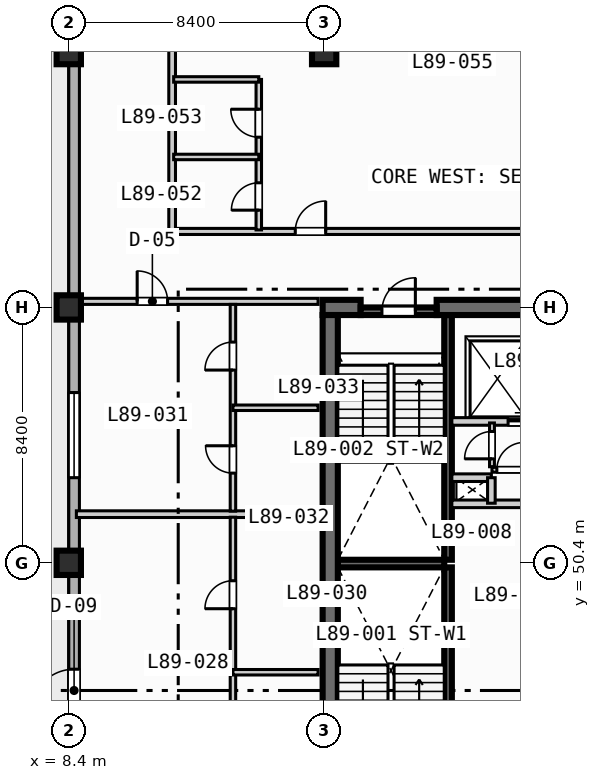
"""IFC4 building model, lengths in metres.
Left out: names, types, materials, properties, quantities, classifications, styles, units other than length and angle.
Written with IfcOpenShell. Run it as: python <this file> out.ifc"""

import sys

from ifc_helpers import new_model, si_unit, direction, frame, frame_2d, origin, origin_2d, place, context, subcontext, project, spatial, rectangle, extrude, element, fill, save


model = new_model("IFC4")
c1 = context("Model", 3, precision=1e-05, world=origin(), true_north=direction((0.0, 1.0)))
c2 = subcontext(c1, "Body", "Model", "MODEL_VIEW")
j1 = project(units=[si_unit("LENGTHUNIT", "METRE"), si_unit("PLANEANGLEUNIT", "RADIAN")], contexts=[c1])
p1 = place(None, origin())
s1 = spatial("IfcSite", under=j1, at=p1, CompositionType="ELEMENT")
p2 = place(p1, origin())
s2 = spatial("IfcBuilding", under=s1, at=p2, CompositionType="ELEMENT")
p3 = place(p2, frame((0.0, 0.0, 359.6)))
s3 = spatial("IfcBuildingStorey", under=s2, at=p3, CompositionType="ELEMENT", Elevation=359.6)
for number, where, z_axis, x_axis in (
    (1, (20.875, 42.2, 0.0), (0.0, 0.0, 1.0), (0.0, 1.0, 0.0)),
    (2, (20.875, 50.5, 0.0), (0.0, 0.0, 1.0), (0.0, 1.0, 0.0)),
):
    element("IfcWall", number, at=place(p3, frame(where, z_axis=z_axis, x_axis=x_axis)), inside=s3, PredefinedType="SOLIDWALL", context=c2, shape_type="SweptSolid", body=[
        extrude(rectangle(XDim=8.05, YDim=0.25, at=frame_2d((4.025, 0.0))), origin(), (0.0, 0.0, 1.0), 3.9),
    ])
p4 = place(p3, frame((17.25, 50.375, 0.0), z_axis=(0.0, 0.0, 1.0), x_axis=(1.0, 0.0, 0.0)))
e3 = element("IfcWall", 3, at=p4, inside=s3, PredefinedType="SOLIDWALL", context=c2, shape_type="SweptSolid", body=[
    extrude(rectangle(XDim=3.5, YDim=0.25, at=frame_2d((1.75, 0.0))), origin(), (0.0, 0.0, 1.0), 3.9),
])
p5 = place(p3, frame((16.75, 58.8, 0.0), z_axis=(0.0, 0.0, 1.0), x_axis=(1.0, 0.0, 0.0)))
e4 = element("IfcWall", 4, at=p5, inside=s3, PredefinedType="SHEAR", context=c2, shape_type="SweptSolid", body=[
    extrude(rectangle(XDim=1.25, YDim=0.5, at=frame_2d((0.625, 0.0))), origin(), (0.0, 0.0, 1.0), 3.9),
])
p6 = place(p3, frame((20.5, 58.8, 0.0), z_axis=(0.0, 0.0, 1.0), x_axis=(1.0, 0.0, 0.0)))
e5 = element("IfcWall", 5, at=p6, inside=s3, PredefinedType="SHEAR", context=c2, shape_type="SweptSolid", body=[
    extrude(rectangle(XDim=4.95, YDim=0.5, at=frame_2d((2.475, 0.0))), origin(), (0.0, 0.0, 1.0), 3.9),
])
p7 = place(p3, frame((17.0, 42.2, 0.0), z_axis=(0.0, 0.0, 1.0), x_axis=(0.0, 1.0, 0.0)))
e6 = element("IfcWall", 6, at=p7, inside=s3, PredefinedType="SHEAR", context=c2, shape_type="SweptSolid", body=[
    extrude(rectangle(XDim=16.35, YDim=0.5, at=frame_2d((8.175, 0.0))), origin(), (0.0, 0.0, 1.0), 3.9),
])
for number, where, z_axis, x_axis in (
    (7, (8.4, 50.4, 0.0), (0.0, 0.0, 1.0), (1.0, 0.0, 0.0)),
    (8, (8.4, 58.8, 0.0), (0.0, 0.0, 1.0), (1.0, 0.0, 0.0)),
    (9, (8.4, 67.2, 0.0), (0.0, 0.0, 1.0), (1.0, 0.0, 0.0)),
    (10, (16.8, 67.2, 0.0), (0.0, 0.0, 1.0), (1.0, 0.0, 0.0)),
):
    element("IfcColumn", number, at=place(p3, frame(where, z_axis=z_axis, x_axis=x_axis)), inside=s3, PredefinedType="COLUMN", context=c2, shape_type="SweptSolid", body=[
        extrude(rectangle(XDim=0.8, YDim=0.8, at=origin_2d()), origin(), (0.0, 0.0, 1.0), 4.2),
    ])
p8 = place(p3, frame((8.575, 11.575, 0.0), z_axis=(0.0, 0.0, 1.0), x_axis=(0.0, 1.0, 0.0)))
e11 = element("IfcWall", 11, at=p8, inside=s3, PredefinedType="STANDARD", context=c2, shape_type="SweptSolid", body=[
    extrude(rectangle(XDim=60.85, YDim=0.35, at=frame_2d((30.425, 0.0))), origin(), (0.0, 0.0, 1.0), 3.9),
])
p9 = place(p8, frame((33.925, 0.0, 0.0)))
e12 = element("IfcOpeningElement", 12, at=p9, cuts=e11, PredefinedType="OPENING", context=c2, shape_type="SweptSolid", body=[
    extrude(rectangle(XDim=1.4, YDim=2.2, at=frame_2d((0.7, 1.1))), frame((0.0, 0.185, 0.0), z_axis=(0.0, -1.0, 0.0), x_axis=(1.0, 0.0, 0.0)), (0.0, 0.0, 1.0), 0.37),
])
p10 = place(p8, frame((24.825, 0.0, 0.85)))
e13 = element("IfcOpeningElement", 13, at=p10, cuts=e11, PredefinedType="OPENING", context=c2, shape_type="SweptSolid", body=[
    extrude(rectangle(XDim=2.8, YDim=2.1, at=frame_2d((1.4, 1.05))), frame((0.0, 0.185, 0.0), z_axis=(0.0, -1.0, 0.0), x_axis=(1.0, 0.0, 0.0)), (0.0, 0.0, 1.0), 0.37),
])
p11 = place(p8, frame((41.625, 0.0, 0.85)))
e14 = element("IfcOpeningElement", 14, at=p11, cuts=e11, PredefinedType="OPENING", context=c2, shape_type="SweptSolid", body=[
    extrude(rectangle(XDim=2.8, YDim=2.1, at=frame_2d((1.4, 1.05))), frame((0.0, 0.185, 0.0), z_axis=(0.0, -1.0, 0.0), x_axis=(1.0, 0.0, 0.0)), (0.0, 0.0, 1.0), 0.37),
])
p12 = place(p8, frame((19.25, 0.0, 0.85)))
e15 = element("IfcOpeningElement", 15, at=p12, cuts=e11, PredefinedType="OPENING", context=c2, shape_type="SweptSolid", body=[
    extrude(rectangle(XDim=1.8, YDim=1.8, at=frame_2d((0.9, 0.9))), frame((0.0, 0.185, 0.0), z_axis=(0.0, -1.0, 0.0), x_axis=(1.0, 0.0, 0.0)), (0.0, 0.0, 1.0), 0.37),
])
p13 = place(p3, frame((18.0, 58.675, 0.0), z_axis=(0.0, 0.0, 1.0), x_axis=(1.0, 0.0, 0.0)))
e16 = element("IfcWall", 16, at=p13, inside=s3, PredefinedType="SOLIDWALL", context=c2, shape_type="SweptSolid", body=[
    extrude(rectangle(XDim=2.5, YDim=0.25, at=frame_2d((1.25, 0.0))), origin(), (0.0, 0.0, 1.0), 3.9),
])
p14 = place(p13, frame((0.7, 0.0, 0.0)))
e17 = element("IfcOpeningElement", 17, at=p14, cuts=e16, PredefinedType="OPENING", context=c2, shape_type="SweptSolid", body=[
    extrude(rectangle(XDim=1.1, YDim=2.15, at=frame_2d((0.55, 1.075))), frame((0.0, 0.135, 0.0), z_axis=(0.0, -1.0, 0.0), x_axis=(1.0, 0.0, 0.0)), (0.0, 0.0, 1.0), 0.27),
])
p15 = place(p3, frame((21.0, 52.34, 0.0), z_axis=(0.0, 0.0, 1.0), x_axis=(1.0, 0.0, 0.0)))
e18 = element("IfcWall", 18, at=p15, inside=s3, PredefinedType="SOLIDWALL", context=c2, shape_type="SweptSolid", body=[
    extrude(rectangle(XDim=3.95, YDim=0.25, at=frame_2d((1.975, 0.0))), origin(), (0.0, 0.0, 1.0), 3.9),
])
p16 = place(p3, frame((21.0, 55.05, 0.0), z_axis=(0.0, 0.0, 1.0), x_axis=(1.0, 0.0, 0.0)))
e19 = element("IfcWall", 19, at=p16, inside=s3, PredefinedType="SOLIDWALL", context=c2, shape_type="SweptSolid", body=[
    extrude(rectangle(XDim=4.15, YDim=0.25, at=frame_2d((2.075, 0.0))), origin(), (0.0, 0.0, 1.0), 3.9),
])
p17 = place(p16, frame((1.85, 0.0, 0.0)))
e20 = element("IfcOpeningElement", 20, at=p17, cuts=e19, PredefinedType="OPENING", context=c2, shape_type="SweptSolid", body=[
    extrude(rectangle(XDim=1.1, YDim=2.15, at=frame_2d((0.55, 1.075))), frame((0.0, 0.135, 0.0), z_axis=(0.0, -1.0, 0.0), x_axis=(1.0, 0.0, 0.0)), (0.0, 0.0, 1.0), 0.27),
])
p18 = place(p3, frame((21.0, 53.2, 0.0), z_axis=(0.0, 0.0, 1.0), x_axis=(1.0, 0.0, 0.0)))
e21 = element("IfcWall", 21, at=p18, inside=s3, PredefinedType="SOLIDWALL", context=c2, shape_type="SweptSolid", body=[
    extrude(rectangle(XDim=1.3, YDim=0.25, at=frame_2d((0.65, 0.0))), origin(), (0.0, 0.0, 1.0), 3.9),
])
p19 = place(p3, frame((22.3, 52.36, 0.0), z_axis=(0.0, 0.0, 1.0), x_axis=(0.0, 1.0, 0.0)))
e22 = element("IfcWall", 22, at=p19, inside=s3, PredefinedType="SOLIDWALL", context=c2, shape_type="SweptSolid", body=[
    extrude(rectangle(XDim=0.84, YDim=0.25, at=frame_2d((0.42, 0.0))), origin(), (0.0, 0.0, 1.0), 3.9),
])
p20 = place(p3, frame((22.32, 53.56, 0.0), z_axis=(0.0, 0.0, 1.0), x_axis=(0.0, 1.0, 0.0)))
e23 = element("IfcWall", 23, at=p20, inside=s3, PredefinedType="PARTITIONING", context=c2, shape_type="SweptSolid", body=[
    extrude(rectangle(XDim=1.44, YDim=0.16, at=frame_2d((0.72, 0.0))), origin(), (0.0, 0.0, 1.0), 3.9),
])
p21 = place(p20, frame((0.26, 0.0, 0.0)))
e24 = element("IfcOpeningElement", 24, at=p21, cuts=e23, PredefinedType="OPENING", context=c2, shape_type="SweptSolid", body=[
    extrude(rectangle(XDim=0.9, YDim=2.1, at=frame_2d((0.45, 1.05))), frame((0.0, 0.09, 0.0), z_axis=(0.0, -1.0, 0.0), x_axis=(1.0, 0.0, 0.0)), (0.0, 0.0, 1.0), 0.18),
])
p22 = place(p3, frame((22.32, 53.46, 0.0), z_axis=(0.0, 0.0, 1.0), x_axis=(1.0, 0.0, 0.0)))
e25 = element("IfcWall", 25, at=p22, inside=s3, PredefinedType="PARTITIONING", context=c2, shape_type="SweptSolid", body=[
    extrude(rectangle(XDim=2.36, YDim=0.16, at=frame_2d((1.18, 0.0))), origin(), (0.0, 0.0, 1.0), 3.9),
])
p23 = place(p22, frame((0.16, 0.0, 0.0)))
e26 = element("IfcOpeningElement", 26, at=p23, cuts=e25, PredefinedType="OPENING", context=c2, shape_type="SweptSolid", body=[
    extrude(rectangle(XDim=0.9, YDim=2.1, at=frame_2d((0.45, 1.05))), frame((0.0, 0.09, 0.0), z_axis=(0.0, -1.0, 0.0), x_axis=(1.0, 0.0, 0.0)), (0.0, 0.0, 1.0), 0.18),
])
p24 = place(p3, frame((8.65, 59.0, 0.0), z_axis=(0.0, 0.0, 1.0), x_axis=(1.0, 0.0, 0.0)))
e27 = element("IfcWall", 27, at=p24, inside=s3, PredefinedType="PARTITIONING", context=c2, shape_type="SweptSolid", body=[
    extrude(rectangle(XDim=7.95, YDim=0.2, at=frame_2d((3.975, 0.0))), origin(), (0.0, 0.0, 1.0), 3.437),
])
p25 = place(p24, frame((2.0, 0.0, 0.0)))
e28 = element("IfcOpeningElement", 28, at=p25, cuts=e27, PredefinedType="OPENING", context=c2, shape_type="SweptSolid", body=[
    extrude(rectangle(XDim=1.0, YDim=2.15, at=frame_2d((0.5, 1.075))), frame((0.0, 0.11, 0.0), z_axis=(0.0, -1.0, 0.0), x_axis=(1.0, 0.0, 0.0)), (0.0, 0.0, 1.0), 0.22),
])
p26 = place(p3, frame((8.65, 52.0, 0.0), z_axis=(0.0, 0.0, 1.0), x_axis=(1.0, 0.0, 0.0)))
e29 = element("IfcWall", 29, at=p26, inside=s3, PredefinedType="PARTITIONING", context=c2, shape_type="SweptSolid", body=[
    extrude(rectangle(XDim=7.95, YDim=0.22, at=frame_2d((3.975, 0.0))), origin(), (0.0, 0.0, 1.0), 3.9),
])
p27 = place(p3, frame((13.8, 41.7, 0.0), z_axis=(0.0, 0.0, 1.0), x_axis=(0.0, 1.0, 0.0)))
e30 = element("IfcWall", 30, at=p27, inside=s3, PredefinedType="PLUMBINGWALL", context=c2, shape_type="SweptSolid", body=[
    extrude(rectangle(XDim=10.2, YDim=0.18, at=frame_2d((5.1, 0.0))), origin(), (0.0, 0.0, 1.0), 3.9),
])
p28 = place(p27, frame((2.1, 0.0, 0.0)))
e31 = element("IfcOpeningElement", 31, at=p28, cuts=e30, PredefinedType="OPENING", context=c2, shape_type="SweptSolid", body=[
    extrude(rectangle(XDim=0.9, YDim=2.1, at=frame_2d((0.45, 1.05))), frame((0.0, 0.1, 0.0), z_axis=(0.0, -1.0, 0.0), x_axis=(1.0, 0.0, 0.0)), (0.0, 0.0, 1.0), 0.2),
])
p29 = place(p27, frame((7.19, 0.0, 0.0)))
e32 = element("IfcOpeningElement", 32, at=p29, cuts=e30, PredefinedType="OPENING", context=c2, shape_type="SweptSolid", body=[
    extrude(rectangle(XDim=0.92, YDim=2.1, at=frame_2d((0.46, 1.05))), frame((0.0, 0.1, 0.0), z_axis=(0.0, -1.0, 0.0), x_axis=(1.0, 0.0, 0.0)), (0.0, 0.0, 1.0), 0.2),
])
p30 = place(p3, frame((13.8, 46.8, 0.0), z_axis=(0.0, 0.0, 1.0), x_axis=(1.0, 0.0, 0.0)))
e33 = element("IfcWall", 33, at=p30, inside=s3, PredefinedType="PLUMBINGWALL", context=c2, shape_type="SweptSolid", body=[
    extrude(rectangle(XDim=2.8, YDim=0.18, at=frame_2d((1.4, 0.0))), origin(), (0.0, 0.0, 1.0), 3.9),
])
p31 = place(p3, frame((13.8, 52.1, 0.0), z_axis=(0.0, 0.0, 1.0), x_axis=(0.0, 1.0, 0.0)))
e34 = element("IfcWall", 34, at=p31, inside=s3, PredefinedType="PLUMBINGWALL", context=c2, shape_type="SweptSolid", body=[
    extrude(rectangle(XDim=6.8, YDim=0.18, at=frame_2d((3.4, 0.0))), origin(), (0.0, 0.0, 1.0), 3.9),
])
p32 = place(p31, frame((1.25, 0.0, 0.0)))
e35 = element("IfcOpeningElement", 35, at=p32, cuts=e34, PredefinedType="OPENING", context=c2, shape_type="SweptSolid", body=[
    extrude(rectangle(XDim=0.9, YDim=2.1, at=frame_2d((0.45, 1.05))), frame((0.0, 0.1, 0.0), z_axis=(0.0, -1.0, 0.0), x_axis=(1.0, 0.0, 0.0)), (0.0, 0.0, 1.0), 0.2),
])
p33 = place(p31, frame((4.64, 0.0, 0.0)))
e36 = element("IfcOpeningElement", 36, at=p33, cuts=e34, PredefinedType="OPENING", context=c2, shape_type="SweptSolid", body=[
    extrude(rectangle(XDim=0.92, YDim=2.1, at=frame_2d((0.46, 1.05))), frame((0.0, 0.1, 0.0), z_axis=(0.0, -1.0, 0.0), x_axis=(1.0, 0.0, 0.0)), (0.0, 0.0, 1.0), 0.2),
])
p34 = place(p3, frame((13.8, 55.5, 0.0), z_axis=(0.0, 0.0, 1.0), x_axis=(1.0, 0.0, 0.0)))
e37 = element("IfcWall", 37, at=p34, inside=s3, PredefinedType="PLUMBINGWALL", context=c2, shape_type="SweptSolid", body=[
    extrude(rectangle(XDim=2.8, YDim=0.18, at=frame_2d((1.4, 0.0))), origin(), (0.0, 0.0, 1.0), 3.9),
])
p35 = place(p3, frame((11.8, 61.3, 0.0), z_axis=(0.0, 0.0, 1.0), x_axis=(1.0, 0.0, 0.0)))
e38 = element("IfcWall", 38, at=p35, inside=s3, PredefinedType="PARTITIONING", context=c2, shape_type="SweptSolid", body=[
    extrude(rectangle(XDim=21.35, YDim=0.2, at=frame_2d((10.675, 0.0))), origin(), (0.0, 0.0, 1.0), 3.9),
])
p36 = place(p35, frame((4.05, 0.0, 0.0)))
e39 = element("IfcOpeningElement", 39, at=p36, cuts=e38, PredefinedType="OPENING", context=c2, shape_type="SweptSolid", body=[
    extrude(rectangle(XDim=1.0, YDim=2.15, at=frame_2d((0.5, 1.075))), frame((0.0, 0.11, 0.0), z_axis=(0.0, -1.0, 0.0), x_axis=(1.0, 0.0, 0.0)), (0.0, 0.0, 1.0), 0.22),
])
p37 = place(p3, frame((11.8, 61.3, 0.0), z_axis=(0.0, 0.0, 1.0), x_axis=(0.0, 1.0, 0.0)))
e40 = element("IfcWall", 40, at=p37, inside=s3, PredefinedType="PARTITIONING", context=c2, shape_type="SweptSolid", body=[
    extrude(rectangle(XDim=11.1, YDim=0.22, at=frame_2d((5.55, 0.0))), origin(), (0.0, 0.0, 1.0), 3.9),
])
p38 = place(p3, frame((14.65, 61.35, 0.0), z_axis=(0.0, 0.0, 1.0), x_axis=(0.0, 1.0, 0.0)))
e41 = element("IfcWall", 41, at=p38, inside=s3, PredefinedType="PLUMBINGWALL", context=c2, shape_type="SweptSolid", body=[
    extrude(rectangle(XDim=4.95, YDim=0.18, at=frame_2d((2.475, 0.0))), origin(), (0.0, 0.0, 1.0), 3.9),
])
p39 = place(p38, frame((0.65, 0.0, 0.0)))
e42 = element("IfcOpeningElement", 42, at=p39, cuts=e41, PredefinedType="OPENING", context=c2, shape_type="SweptSolid", body=[
    extrude(rectangle(XDim=0.9, YDim=2.1, at=frame_2d((0.45, 1.05))), frame((0.0, 0.1, 0.0), z_axis=(0.0, -1.0, 0.0), x_axis=(1.0, 0.0, 0.0)), (0.0, 0.0, 1.0), 0.2),
])
p40 = place(p38, frame((3.05, 0.0, 0.0)))
e43 = element("IfcOpeningElement", 43, at=p40, cuts=e41, PredefinedType="OPENING", context=c2, shape_type="SweptSolid", body=[
    extrude(rectangle(XDim=0.92, YDim=2.1, at=frame_2d((0.46, 1.05))), frame((0.0, 0.1, 0.0), z_axis=(0.0, -1.0, 0.0), x_axis=(1.0, 0.0, 0.0)), (0.0, 0.0, 1.0), 0.2),
])
for number, where, z_axis, x_axis in (
    (44, (11.85, 63.75, 0.0), (0.0, 0.0, 1.0), (1.0, 0.0, 0.0)),
    (45, (11.85, 66.3, 0.0), (0.0, 0.0, 1.0), (1.0, 0.0, 0.0)),
):
    element("IfcWall", number, at=place(p3, frame(where, z_axis=z_axis, x_axis=x_axis)), inside=s3, PredefinedType="PLUMBINGWALL", context=c2, shape_type="SweptSolid", body=[
        extrude(rectangle(XDim=2.8, YDim=0.18, at=frame_2d((1.4, 0.0))), origin(), (0.0, 0.0, 1.0), 3.9),
    ])
p41 = place(p9, origin())
e46 = element("IfcDoor", 46, at=p41, inside=s3, OperationType="SINGLE_SWING_LEFT", PredefinedType="DOOR", context=c2, shape_type="SweptSolid", body=[
    extrude(rectangle(XDim=1.4, YDim=2.2, at=frame_2d((0.7, 1.1))), frame((0.0, 0.025, 0.0), z_axis=(0.0, -1.0, 0.0), x_axis=(1.0, 0.0, 0.0)), (0.0, 0.0, 1.0), 0.05),
])
fill(e12, e46)
p42 = place(p11, origin())
e47 = element("IfcWindow", 47, at=p42, inside=s3, PartitioningType="SINGLE_PANEL", PredefinedType="WINDOW", context=c2, shape_type="SweptSolid", body=[
    extrude(rectangle(XDim=2.8, YDim=2.1, at=frame_2d((1.4, 1.05))), frame((0.0, 0.03, 0.0), z_axis=(0.0, -1.0, 0.0), x_axis=(1.0, 0.0, 0.0)), (0.0, 0.0, 1.0), 0.06),
])
fill(e14, e47)
p43 = place(p14, origin())
e48 = element("IfcDoor", 48, at=p43, inside=s3, OperationType="SINGLE_SWING_RIGHT", PredefinedType="DOOR", context=c2, shape_type="SweptSolid", body=[
    extrude(rectangle(XDim=1.1, YDim=2.15, at=frame_2d((0.55, 1.075))), frame((0.0, 0.025, 0.0), z_axis=(0.0, -1.0, 0.0), x_axis=(1.0, 0.0, 0.0)), (0.0, 0.0, 1.0), 0.05),
])
fill(e17, e48)
p44 = place(p17, origin())
e49 = element("IfcDoor", 49, at=p44, inside=s3, OperationType="SLIDING_TO_LEFT", PredefinedType="DOOR", context=c2, shape_type="SweptSolid", body=[
    extrude(rectangle(XDim=1.1, YDim=2.15, at=frame_2d((0.55, 1.075))), frame((0.0, 0.025, 0.0), z_axis=(0.0, -1.0, 0.0), x_axis=(1.0, 0.0, 0.0)), (0.0, 0.0, 1.0), 0.05),
])
fill(e20, e49)
p45 = place(p21, origin())
e50 = element("IfcDoor", 50, at=p45, inside=s3, OperationType="SINGLE_SWING_LEFT", PredefinedType="DOOR", context=c2, shape_type="SweptSolid", body=[
    extrude(rectangle(XDim=0.9, YDim=2.1, at=frame_2d((0.45, 1.05))), frame((0.0, 0.025, 0.0), z_axis=(0.0, -1.0, 0.0), x_axis=(1.0, 0.0, 0.0)), (0.0, 0.0, 1.0), 0.05),
])
fill(e24, e50)
p46 = place(p23, origin())
e51 = element("IfcDoor", 51, at=p46, inside=s3, OperationType="SINGLE_SWING_RIGHT", PredefinedType="DOOR", context=c2, shape_type="SweptSolid", body=[
    extrude(rectangle(XDim=0.9, YDim=2.1, at=frame_2d((0.45, 1.05))), frame((0.0, 0.025, 0.0), z_axis=(0.0, -1.0, 0.0), x_axis=(1.0, 0.0, 0.0)), (0.0, 0.0, 1.0), 0.05),
])
fill(e26, e51)
p47 = place(p25, origin())
e52 = element("IfcDoor", 52, at=p47, inside=s3, OperationType="SINGLE_SWING_LEFT", PredefinedType="DOOR", context=c2, shape_type="SweptSolid", body=[
    extrude(rectangle(XDim=1.0, YDim=2.15, at=frame_2d((0.5, 1.075))), frame((0.0, 0.025, 0.0), z_axis=(0.0, -1.0, 0.0), x_axis=(1.0, 0.0, 0.0)), (0.0, 0.0, 1.0), 0.05),
])
fill(e28, e52)
p48 = place(p29, origin())
e53 = element("IfcDoor", 53, at=p48, inside=s3, OperationType="SINGLE_SWING_LEFT", PredefinedType="DOOR", context=c2, shape_type="SweptSolid", body=[
    extrude(rectangle(XDim=0.92, YDim=2.1, at=frame_2d((0.46, 1.05))), frame((0.0, 0.025, 0.0), z_axis=(0.0, -1.0, 0.0), x_axis=(1.0, 0.0, 0.0)), (0.0, 0.0, 1.0), 0.05),
])
fill(e32, e53)
p49 = place(p32, origin())
e54 = element("IfcDoor", 54, at=p49, inside=s3, OperationType="SINGLE_SWING_RIGHT", PredefinedType="DOOR", context=c2, shape_type="SweptSolid", body=[
    extrude(rectangle(XDim=0.9, YDim=2.1, at=frame_2d((0.45, 1.05))), frame((0.0, 0.025, 0.0), z_axis=(0.0, -1.0, 0.0), x_axis=(1.0, 0.0, 0.0)), (0.0, 0.0, 1.0), 0.05),
])
fill(e35, e54)
p50 = place(p33, origin())
e55 = element("IfcDoor", 55, at=p50, inside=s3, OperationType="SINGLE_SWING_LEFT", PredefinedType="DOOR", context=c2, shape_type="SweptSolid", body=[
    extrude(rectangle(XDim=0.92, YDim=2.1, at=frame_2d((0.46, 1.05))), frame((0.0, 0.025, 0.0), z_axis=(0.0, -1.0, 0.0), x_axis=(1.0, 0.0, 0.0)), (0.0, 0.0, 1.0), 0.05),
])
fill(e36, e55)
p51 = place(p36, origin())
e56 = element("IfcDoor", 56, at=p51, inside=s3, OperationType="SINGLE_SWING_RIGHT", PredefinedType="DOOR", context=c2, shape_type="SweptSolid", body=[
    extrude(rectangle(XDim=1.0, YDim=2.15, at=frame_2d((0.5, 1.075))), frame((0.0, 0.025, 0.0), z_axis=(0.0, -1.0, 0.0), x_axis=(1.0, 0.0, 0.0)), (0.0, 0.0, 1.0), 0.05),
])
fill(e39, e56)
p52 = place(p39, origin())
e57 = element("IfcDoor", 57, at=p52, inside=s3, OperationType="SINGLE_SWING_LEFT", PredefinedType="DOOR", context=c2, shape_type="SweptSolid", body=[
    extrude(rectangle(XDim=0.9, YDim=2.1, at=frame_2d((0.45, 1.05))), frame((0.0, 0.025, 0.0), z_axis=(0.0, -1.0, 0.0), x_axis=(1.0, 0.0, 0.0)), (0.0, 0.0, 1.0), 0.05),
])
fill(e42, e57)
p53 = place(p40, origin())
e58 = element("IfcDoor", 58, at=p53, inside=s3, OperationType="SINGLE_SWING_RIGHT", PredefinedType="DOOR", context=c2, shape_type="SweptSolid", body=[
    extrude(rectangle(XDim=0.92, YDim=2.1, at=frame_2d((0.46, 1.05))), frame((0.0, 0.025, 0.0), z_axis=(0.0, -1.0, 0.0), x_axis=(1.0, 0.0, 0.0)), (0.0, 0.0, 1.0), 0.05),
])
fill(e43, e58)
save(model, sys.argv[1])
